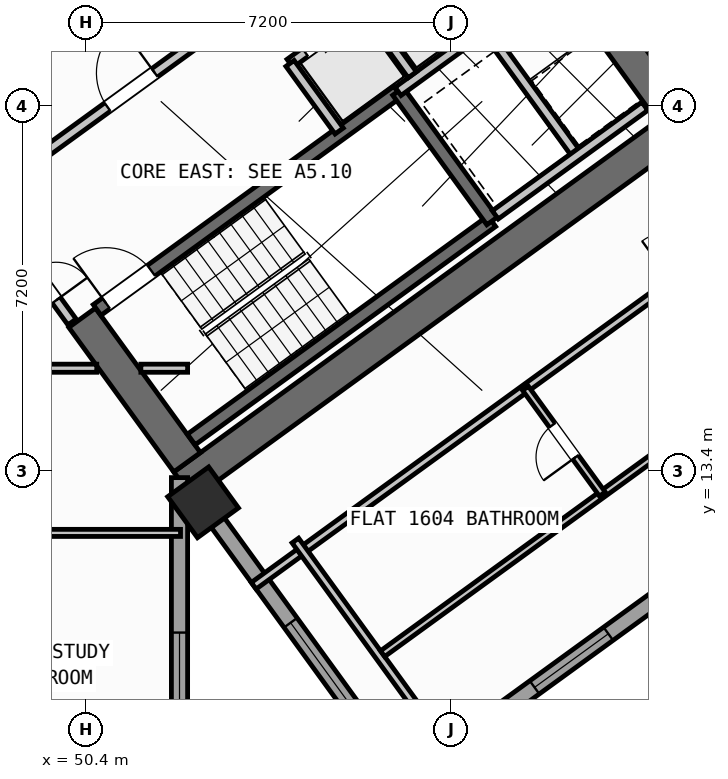
"""IFC4 building model, lengths in metres.
Left out: names, types, materials, properties, quantities, classifications, styles, units other than length and angle.
Written with IfcOpenShell. Run it as: python <this file> out.ifc"""

import sys

from ifc_helpers import new_model, si_unit, direction, frame, frame_2d, origin, origin_2d, place, context, subcontext, project, spatial, rectangle, hollow_rectangle, extrude, source, transform, mapped, element, fill, save


model = new_model("IFC4")
c1 = context("Model", 3, precision=1e-05, world=origin(), true_north=direction((0.0, 1.0)))
c2 = subcontext(c1, "Body", "Model", "MODEL_VIEW")
j1 = project(units=[si_unit("LENGTHUNIT", "METRE"), si_unit("PLANEANGLEUNIT", "RADIAN")], contexts=[c1])
p1 = place(None, origin())
s1 = spatial("IfcSite", under=j1, at=p1, CompositionType="ELEMENT")
p2 = place(p1, origin())
s2 = spatial("IfcBuilding", under=s1, at=p2, CompositionType="ELEMENT")
p3 = place(p2, frame((0.0, 0.0, 63.6)))
s3 = spatial("IfcBuildingStorey", under=s2, at=p3, CompositionType="ELEMENT", Elevation=63.6)
p4 = place(p3, frame((52.318, 13.11, 0.0), z_axis=(0.0, 0.0, 1.0), x_axis=(0.809019445368, 0.587781878776, 0.0)))
e1 = element("IfcWall", 1, at=p4, inside=s3, PredefinedType="SHEAR", context=c2, shape_type="SweptSolid", body=[
    extrude(rectangle(XDim=12.44, YDim=0.65, at=frame_2d((6.22, 0.0))), origin(), (0.0, 0.0, 1.0), 3.35),
])
p5 = place(p3, frame((52.39, 13.564, 0.0), z_axis=(0.0, 0.0, 1.0), x_axis=(-0.58779688989, 0.809008539037, 0.0)))
e2 = element("IfcWall", 2, at=p5, inside=s3, PredefinedType="SHEAR", context=c2, shape_type="SweptSolid", body=[
    extrude(rectangle(XDim=3.525, YDim=0.65, at=frame_2d((1.763, 0.0))), origin(), (0.0, 0.0, 1.0), 3.35),
])
p6 = place(p3, frame((61.929, 20.494, 0.0), z_axis=(0.0, 0.0, 1.0), x_axis=(-0.58782982593, 0.808984607855, 0.0)))
e3 = element("IfcWall", 3, at=p6, inside=s3, PredefinedType="SHEAR", context=c2, shape_type="SweptSolid", body=[
    extrude(rectangle(XDim=3.525, YDim=0.65, at=frame_2d((1.762, 0.0))), origin(), (0.0, 0.0, 1.0), 3.35),
])
m1 = source(origin(), c2, "Body", "SweptSolid", [
    extrude(hollow_rectangle(XDim=1.0, YDim=1.0, WallThickness=0.04, at=origin_2d()), origin(), (0.0, 0.0, 1.0), 3.6),
])
p7 = place(p3, frame((52.705, 12.773, 0.0), z_axis=(0.0, 0.0, 1.0), x_axis=(0.809016994375, 0.587785252292, 0.0)))
e4 = element("IfcColumn", 4, at=p7, inside=s3, PredefinedType="COLUMN", context=c2, shape_type="MappedRepresentation", body=[
    mapped(m1, transform((0.0, 0.0, 0.0), scale=1.0)),
])
p8 = place(p3, frame((58.455, 35.484, 0.0), z_axis=(0.0, 0.0, 1.0), x_axis=(0.587783625747, -0.809018176127, 0.0)))
e5 = element("IfcWall", 5, at=p8, inside=s3, PredefinedType="STANDARD", context=c2, shape_type="SweptSolid", body=[
    extrude(rectangle(XDim=21.587, YDim=0.32, at=frame_2d((10.794, 0.0))), origin(), (0.0, 0.0, 1.0), 2.725),
])
p9 = place(p8, frame((2.994, 0.0, 0.8)))
e6 = element("IfcOpeningElement", 6, at=p9, cuts=e5, PredefinedType="OPENING", context=c2, shape_type="SweptSolid", body=[
    extrude(rectangle(XDim=2.1, YDim=1.55, at=frame_2d((1.05, 0.775))), frame((0.0, 0.17, 0.0), z_axis=(0.0, -1.0, 0.0), x_axis=(1.0, 0.0, 0.0)), (0.0, 0.0, 1.0), 0.34),
])
p10 = place(p8, frame((11.934, 0.0, 0.85)))
e7 = element("IfcOpeningElement", 7, at=p10, cuts=e5, PredefinedType="OPENING", context=c2, shape_type="SweptSolid", body=[
    extrude(rectangle(XDim=1.8, YDim=1.5, at=frame_2d((0.9, 0.75))), frame((0.0, 0.17, 0.0), z_axis=(0.0, -1.0, 0.0), x_axis=(1.0, 0.0, 0.0)), (0.0, 0.0, 1.0), 0.34),
])
p11 = place(p8, frame((18.535, 0.0, 0.85)))
e8 = element("IfcOpeningElement", 8, at=p11, cuts=e5, PredefinedType="OPENING", context=c2, shape_type="SweptSolid", body=[
    extrude(rectangle(XDim=1.5, YDim=1.5, at=frame_2d((0.75, 0.75))), frame((0.0, 0.17, 0.0), z_axis=(0.0, -1.0, 0.0), x_axis=(1.0, 0.0, 0.0)), (0.0, 0.0, 1.0), 0.34),
])
p12 = place(p3, frame((71.098, 17.731, 0.0), z_axis=(0.0, 0.0, 1.0), x_axis=(-0.809021120468, -0.587779573171, 0.0)))
e9 = element("IfcWall", 9, at=p12, inside=s3, PredefinedType="STANDARD", context=c2, shape_type="SweptSolid", body=[
    extrude(rectangle(XDim=17.588, YDim=0.32, at=frame_2d((8.794, 0.0))), origin(), (0.0, 0.0, 1.0), 3.35),
])
p13 = place(p12, frame((1.624, 0.0, 0.0)))
e10 = element("IfcOpeningElement", 10, at=p13, cuts=e9, PredefinedType="OPENING", context=c2, shape_type="SweptSolid", body=[
    extrude(rectangle(XDim=1.05, YDim=2.15, at=frame_2d((0.525, 1.075))), frame((0.0, 0.17, 0.0), z_axis=(0.0, -1.0, 0.0), x_axis=(1.0, 0.0, 0.0)), (0.0, 0.0, 1.0), 0.34),
])
p14 = place(p12, frame((4.104, 0.0, 1.0)))
e11 = element("IfcOpeningElement", 11, at=p14, cuts=e9, PredefinedType="OPENING", context=c2, shape_type="SweptSolid", body=[
    extrude(rectangle(XDim=0.9, YDim=1.25, at=frame_2d((0.45, 0.625))), frame((0.0, 0.17, 0.0), z_axis=(0.0, -1.0, 0.0), x_axis=(1.0, 0.0, 0.0)), (0.0, 0.0, 1.0), 0.34),
])
p15 = place(p12, frame((7.879, 0.0, 0.85)))
e12 = element("IfcOpeningElement", 12, at=p15, cuts=e9, PredefinedType="OPENING", context=c2, shape_type="SweptSolid", body=[
    extrude(rectangle(XDim=1.8, YDim=1.5, at=frame_2d((0.9, 0.75))), frame((0.0, 0.17, 0.0), z_axis=(0.0, -1.0, 0.0), x_axis=(1.0, 0.0, 0.0)), (0.0, 0.0, 1.0), 0.34),
])
p16 = place(p12, frame((12.849, 0.0, 0.85)))
e13 = element("IfcOpeningElement", 13, at=p16, cuts=e9, PredefinedType="OPENING", context=c2, shape_type="SweptSolid", body=[
    extrude(rectangle(XDim=1.8, YDim=1.5, at=frame_2d((0.9, 0.75))), frame((0.0, 0.17, 0.0), z_axis=(0.0, -1.0, 0.0), x_axis=(1.0, 0.0, 0.0)), (0.0, 0.0, 1.0), 0.34),
])
p17 = place(p3, frame((56.581, 7.439, 0.0), z_axis=(0.0, 0.0, 1.0), x_axis=(-0.587785875463, 0.809016541614, 0.0)))
e14 = element("IfcWall", 14, at=p17, inside=s3, PredefinedType="STANDARD", context=c2, shape_type="SweptSolid", body=[
    extrude(rectangle(XDim=6.774, YDim=0.32, at=frame_2d((3.387, 0.0))), origin(), (0.0, 0.0, 1.0), 2.725),
])
p18 = place(p17, frame((1.556, 0.0, 0.8)))
e15 = element("IfcOpeningElement", 15, at=p18, cuts=e14, PredefinedType="OPENING", context=c2, shape_type="SweptSolid", body=[
    extrude(rectangle(XDim=2.1, YDim=1.55, at=frame_2d((1.05, 0.775))), frame((0.0, 0.17, 0.0), z_axis=(0.0, -1.0, 0.0), x_axis=(1.0, 0.0, 0.0)), (0.0, 0.0, 1.0), 0.34),
])
p19 = place(p3, frame((52.24, 13.261, 0.0), z_axis=(0.0, 0.0, 1.0), x_axis=(0.0, -1.0, 0.0)))
e16 = element("IfcWall", 16, at=p19, inside=s3, PredefinedType="STANDARD", context=c2, shape_type="SweptSolid", body=[
    extrude(rectangle(XDim=9.795, YDim=0.32, at=frame_2d((4.897, 0.0))), origin(), (0.0, 0.0, 1.0), 3.35),
])
p20 = place(p19, frame((3.058, 0.0, 0.8)))
e17 = element("IfcOpeningElement", 17, at=p20, cuts=e16, PredefinedType="OPENING", context=c2, shape_type="SweptSolid", body=[
    extrude(rectangle(XDim=2.1, YDim=1.55, at=frame_2d((1.05, 0.775))), frame((0.0, 0.17, 0.0), z_axis=(0.0, -1.0, 0.0), x_axis=(1.0, 0.0, 0.0)), (0.0, 0.0, 1.0), 0.34),
])
p21 = place(p19, frame((7.88, 0.0, 0.95)))
e18 = element("IfcOpeningElement", 18, at=p21, cuts=e16, PredefinedType="OPENING", context=c2, shape_type="SweptSolid", body=[
    extrude(rectangle(XDim=1.2, YDim=1.4, at=frame_2d((0.6, 0.7))), frame((0.0, 0.17, 0.0), z_axis=(0.0, -1.0, 0.0), x_axis=(1.0, 0.0, 0.0)), (0.0, 0.0, 1.0), 0.34),
])
p22 = place(p3, frame((52.472, 14.013, 0.0), z_axis=(0.0, 0.0, 1.0), x_axis=(0.809028366311, 0.587769599847, 0.0)))
e19 = element("IfcWall", 19, at=p22, inside=s3, PredefinedType="SHEAR", context=c2, shape_type="SweptSolid", body=[
    extrude(rectangle(XDim=7.33, YDim=0.26, at=frame_2d((3.665, 0.0))), origin(), (0.0, 0.0, 1.0), 3.35),
])
p23 = place(p3, frame((50.615, 16.57, 0.0), z_axis=(0.0, 0.0, 1.0), x_axis=(0.809028366311, 0.587769599847, 0.0)))
e20 = element("IfcWall", 20, at=p23, inside=s3, PredefinedType="SHEAR", context=c2, shape_type="SweptSolid", body=[
    extrude(rectangle(XDim=7.33, YDim=0.26, at=frame_2d((3.665, 0.0))), origin(), (0.0, 0.0, 1.0), 3.35),
])
p24 = place(p23, frame((0.22, 0.0, 0.0)))
e21 = element("IfcOpeningElement", 21, at=p24, cuts=e20, PredefinedType="OPENING", context=c2, shape_type="SweptSolid", body=[
    extrude(rectangle(XDim=1.1, YDim=2.1, at=frame_2d((0.55, 1.05))), frame((0.0, 0.14, 0.0), z_axis=(0.0, -1.0, 0.0), x_axis=(1.0, 0.0, 0.0)), (0.0, 0.0, 1.0), 0.28),
])
p25 = place(p3, frame((58.41, 18.327, 0.0), z_axis=(0.0, 0.0, 1.0), x_axis=(-0.58776738483, 0.809029975545, 0.0)))
e22 = element("IfcWall", 22, at=p25, inside=s3, PredefinedType="SHEAR", context=c2, shape_type="SweptSolid", body=[
    extrude(rectangle(XDim=3.16, YDim=0.26, at=frame_2d((1.58, 0.0))), origin(), (0.0, 0.0, 1.0), 3.35),
])
p26 = place(p3, frame((47.106, 21.437, 0.0), z_axis=(0.0, 0.0, 1.0), x_axis=(0.809012514015, 0.58779141893, 0.0)))
e23 = element("IfcWall", 23, at=p26, inside=s3, PredefinedType="STANDARD", context=c2, shape_type="SweptSolid", body=[
    extrude(rectangle(XDim=3.398, YDim=0.2, at=frame_2d((1.699, 0.0))), origin(), (0.0, 0.0, 1.0), 3.34),
])
p27 = place(p26, frame((0.408, 0.0, 0.0)))
e24 = element("IfcOpeningElement", 24, at=p27, cuts=e23, PredefinedType="OPENING", context=c2, shape_type="SweptSolid", body=[
    extrude(rectangle(XDim=1.3, YDim=2.2, at=frame_2d((0.65, 1.1))), frame((0.0, 0.11, 0.0), z_axis=(0.0, -1.0, 0.0), x_axis=(1.0, 0.0, 0.0)), (0.0, 0.0, 1.0), 0.22),
])
p28 = place(p3, frame((48.799, 19.107, 0.0), z_axis=(0.0, 0.0, 1.0), x_axis=(0.809012959416, 0.587790805897, 0.0)))
e25 = element("IfcWall", 25, at=p28, inside=s3, PredefinedType="STANDARD", context=c2, shape_type="SweptSolid", body=[
    extrude(rectangle(XDim=5.718, YDim=0.2, at=frame_2d((2.859, 0.0))), origin(), (0.0, 0.0, 1.0), 3.34),
])
p29 = place(p28, frame((2.498, 0.0, 0.0)))
e26 = element("IfcOpeningElement", 26, at=p29, cuts=e25, PredefinedType="OPENING", context=c2, shape_type="SweptSolid", body=[
    extrude(rectangle(XDim=1.15, YDim=2.1, at=frame_2d((0.575, 1.05))), frame((0.0, 0.11, 0.0), z_axis=(0.0, -1.0, 0.0), x_axis=(1.0, 0.0, 0.0)), (0.0, 0.0, 1.0), 0.22),
])
p30 = place(p3, frame((56.553, 20.884, 0.0), z_axis=(0.0, 0.0, 1.0), x_axis=(0.809035789462, 0.587759382205, 0.0)))
e27 = element("IfcWall", 27, at=p30, inside=s3, PredefinedType="STANDARD", context=c2, shape_type="SweptSolid", body=[
    extrude(rectangle(XDim=3.768, YDim=0.2, at=frame_2d((1.884, 0.0))), origin(), (0.0, 0.0, 1.0), 3.34),
])
p31 = place(p30, frame((2.65, 0.0, 0.0)))
e28 = element("IfcOpeningElement", 28, at=p31, cuts=e27, PredefinedType="OPENING", context=c2, shape_type="SweptSolid", body=[
    extrude(rectangle(XDim=0.86, YDim=2.05, at=frame_2d((0.43, 1.025))), frame((0.0, 0.11, 0.0), z_axis=(0.0, -1.0, 0.0), x_axis=(1.0, 0.0, 0.0)), (0.0, 0.0, 1.0), 0.22),
])
p32 = place(p3, frame((54.421, 21.436, 0.0), z_axis=(0.0, 0.0, 1.0), x_axis=(0.809013710463, 0.587789772183, 0.0)))
e29 = element("IfcWall", 29, at=p32, inside=s3, PredefinedType="STANDARD", context=c2, shape_type="SweptSolid", body=[
    extrude(rectangle(XDim=5.36, YDim=0.2, at=frame_2d((2.68, 0.0))), origin(), (0.0, 0.0, 1.0), 3.34),
])
p33 = place(p32, frame((0.37, 0.0, 0.0)))
e30 = element("IfcOpeningElement", 30, at=p33, cuts=e29, PredefinedType="OPENING", context=c2, shape_type="SweptSolid", body=[
    extrude(rectangle(XDim=1.1, YDim=2.15, at=frame_2d((0.55, 1.075))), frame((0.0, 0.11, 0.0), z_axis=(0.0, -1.0, 0.0), x_axis=(1.0, 0.0, 0.0)), (0.0, 0.0, 1.0), 0.22),
])
p34 = place(p32, frame((2.17, 0.0, 0.0)))
e31 = element("IfcOpeningElement", 31, at=p34, cuts=e29, PredefinedType="OPENING", context=c2, shape_type="SweptSolid", body=[
    extrude(rectangle(XDim=1.1, YDim=2.15, at=frame_2d((0.55, 1.075))), frame((0.0, 0.11, 0.0), z_axis=(0.0, -1.0, 0.0), x_axis=(1.0, 0.0, 0.0)), (0.0, 0.0, 1.0), 0.22),
])
p35 = place(p32, frame((3.97, 0.0, 0.0)))
e32 = element("IfcOpeningElement", 32, at=p35, cuts=e29, PredefinedType="OPENING", context=c2, shape_type="SweptSolid", body=[
    extrude(rectangle(XDim=1.1, YDim=2.15, at=frame_2d((0.55, 1.075))), frame((0.0, 0.11, 0.0), z_axis=(0.0, -1.0, 0.0), x_axis=(1.0, 0.0, 0.0)), (0.0, 0.0, 1.0), 0.22),
])
p36 = place(p3, frame((55.391, 20.102, 0.0), z_axis=(0.0, 0.0, 1.0), x_axis=(-0.58778447739, 0.809017557374, 0.0)))
e33 = element("IfcWall", 33, at=p36, inside=s3, PredefinedType="STANDARD", context=c2, shape_type="SweptSolid", body=[
    extrude(rectangle(XDim=1.65, YDim=0.2, at=frame_2d((0.825, 0.0))), origin(), (0.0, 0.0, 1.0), 3.34),
])
p37 = place(p3, frame((56.834, 21.212, 0.0), z_axis=(0.0, 0.0, 1.0), x_axis=(-0.58776738483, 0.809029975545, 0.0)))
e34 = element("IfcWall", 34, at=p37, inside=s3, PredefinedType="STANDARD", context=c2, shape_type="SweptSolid", body=[
    extrude(rectangle(XDim=1.58, YDim=0.2, at=frame_2d((0.79, 0.0))), origin(), (0.0, 0.0, 1.0), 3.34),
])
p38 = place(p3, frame((60.067, 19.655, 0.0), z_axis=(0.0, 0.0, 1.0), x_axis=(-0.587800520745, 0.809005900975, 0.0)))
e35 = element("IfcWall", 35, at=p38, inside=s3, PredefinedType="STANDARD", context=c2, shape_type="SweptSolid", body=[
    extrude(rectangle(XDim=2.66, YDim=0.2, at=frame_2d((1.33, 0.0))), origin(), (0.0, 0.0, 1.0), 3.34),
])
p39 = place(p3, frame((58.472, 18.447, 0.0), z_axis=(0.0, 0.0, 1.0), x_axis=(0.809022487728, 0.587777691266, 0.0)))
e36 = element("IfcWall", 36, at=p39, inside=s3, PredefinedType="STANDARD", context=c2, shape_type="SweptSolid", body=[
    extrude(rectangle(XDim=3.648, YDim=0.2, at=frame_2d((1.824, 0.0))), origin(), (0.0, 0.0, 1.0), 3.34),
])
p40 = place(p3, frame((35.296, 15.42, 0.0), z_axis=(0.0, 0.0, 1.0), x_axis=(1.0, 0.0, 0.0)))
e37 = element("IfcWall", 37, at=p40, inside=s3, PredefinedType="PARTITIONING", context=c2, shape_type="SweptSolid", body=[
    extrude(rectangle(XDim=15.311, YDim=0.16, at=frame_2d((7.655, 0.0))), origin(), (0.0, 0.0, 1.0), 3.34),
])
p41 = place(p40, frame((3.176, 0.0, 0.0)))
e38 = element("IfcOpeningElement", 38, at=p41, cuts=e37, PredefinedType="OPENING", context=c2, shape_type="SweptSolid", body=[
    extrude(rectangle(XDim=1.0, YDim=2.1, at=frame_2d((0.5, 1.05))), frame((0.0, 0.09, 0.0), z_axis=(0.0, -1.0, 0.0), x_axis=(1.0, 0.0, 0.0)), (0.0, 0.0, 1.0), 0.18),
])
p42 = place(p3, frame((51.477, 15.42, 0.0), z_axis=(0.0, 0.0, 1.0), x_axis=(1.0, 0.0, 0.0)))
e39 = element("IfcWall", 39, at=p42, inside=s3, PredefinedType="PARTITIONING", context=c2, shape_type="SweptSolid", body=[
    extrude(rectangle(XDim=0.923, YDim=0.16, at=frame_2d((0.461, 0.0))), origin(), (0.0, 0.0, 1.0), 3.34),
])
p43 = place(p3, frame((50.119, 16.333, 0.0), z_axis=(0.0, 0.0, 1.0), x_axis=(-0.587749856981, 0.809042709391, 0.0)))
e40 = element("IfcWall", 40, at=p43, inside=s3, PredefinedType="STANDARD", context=c2, shape_type="SweptSolid", body=[
    extrude(rectangle(XDim=2.96, YDim=0.2, at=frame_2d((1.48, 0.0))), origin(), (0.0, 0.0, 1.0), 3.34),
])
p44 = place(p43, frame((0.53, 0.0, 0.0)))
e41 = element("IfcOpeningElement", 41, at=p44, cuts=e40, PredefinedType="OPENING", context=c2, shape_type="SweptSolid", body=[
    extrude(rectangle(XDim=1.5, YDim=2.15, at=frame_2d((0.75, 1.075))), frame((0.0, 0.11, 0.0), z_axis=(0.0, -1.0, 0.0), x_axis=(1.0, 0.0, 0.0)), (0.0, 0.0, 1.0), 0.22),
])
p45 = place(p3, frame((42.344, 12.17, 0.0), z_axis=(0.0, 0.0, 1.0), x_axis=(1.0, 0.0, 0.0)))
e42 = element("IfcWall", 42, at=p45, inside=s3, PredefinedType="PLUMBINGWALL", context=c2, shape_type="SweptSolid", body=[
    extrude(rectangle(XDim=9.916, YDim=0.14, at=frame_2d((4.958, 0.0))), origin(), (0.0, 0.0, 1.0), 2.525),
])
p46 = place(p3, frame((53.705, 11.126, 0.0), z_axis=(0.0, 0.0, 1.0), x_axis=(0.809014504436, 0.587788679384, 0.0)))
e43 = element("IfcWall", 43, at=p46, inside=s3, PredefinedType="PARTITIONING", context=c2, shape_type="SweptSolid", body=[
    extrude(rectangle(XDim=14.67, YDim=0.16, at=frame_2d((7.335, 0.0))), origin(), (0.0, 0.0, 1.0), 3.34),
])
p47 = place(p46, frame((10.2, 0.0, 0.0)))
e44 = element("IfcOpeningElement", 44, at=p47, cuts=e43, PredefinedType="OPENING", context=c2, shape_type="SweptSolid", body=[
    extrude(rectangle(XDim=1.0, YDim=2.1, at=frame_2d((0.5, 1.05))), frame((0.0, 0.09, 0.0), z_axis=(0.0, -1.0, 0.0), x_axis=(1.0, 0.0, 0.0)), (0.0, 0.0, 1.0), 0.18),
])
p48 = place(p3, frame((57.747, 7.586, 0.0), z_axis=(0.0, 0.0, 1.0), x_axis=(-0.587784893399, 0.809017255126, 0.0)))
e45 = element("IfcWall", 45, at=p48, inside=s3, PredefinedType="PARTITIONING", context=c2, shape_type="SweptSolid", body=[
    extrude(rectangle(XDim=5.48, YDim=0.16, at=frame_2d((2.74, 0.0))), origin(), (0.0, 0.0, 1.0), 3.34),
])
p49 = place(p3, frame((56.249, 9.785, 0.0), z_axis=(0.0, 0.0, 1.0), x_axis=(0.809011747655, 0.587792473715, 0.0)))
e46 = element("IfcWall", 46, at=p49, inside=s3, PredefinedType="PLUMBINGWALL", context=c2, shape_type="SweptSolid", body=[
    extrude(rectangle(XDim=13.4, YDim=0.14, at=frame_2d((6.7, 0.0))), origin(), (0.0, 0.0, 1.0), 3.34),
])
p50 = place(p49, frame((8.94, 0.0, 0.0)))
e47 = element("IfcOpeningElement", 47, at=p50, cuts=e46, PredefinedType="OPENING", context=c2, shape_type="SweptSolid", body=[
    extrude(rectangle(XDim=0.92, YDim=2.08, at=frame_2d((0.46, 1.04))), frame((0.0, 0.08, 0.0), z_axis=(0.0, -1.0, 0.0), x_axis=(1.0, 0.0, 0.0)), (0.0, 0.0, 1.0), 0.16),
])
p51 = place(p3, frame((60.585, 12.936, 0.0), z_axis=(0.0, 0.0, 1.0), x_axis=(-0.587772116736, 0.809026537752, 0.0)))
e48 = element("IfcWall", 48, at=p51, inside=s3, PredefinedType="PLUMBINGWALL", context=c2, shape_type="SweptSolid", body=[
    extrude(rectangle(XDim=2.58, YDim=0.14, at=frame_2d((1.29, 0.0))), origin(), (0.0, 0.0, 1.0), 3.34),
])
p52 = place(p51, frame((0.9, 0.0, 0.0)))
e49 = element("IfcOpeningElement", 49, at=p52, cuts=e48, PredefinedType="OPENING", context=c2, shape_type="SweptSolid", body=[
    extrude(rectangle(XDim=0.78, YDim=2.05, at=frame_2d((0.39, 1.025))), frame((0.0, 0.08, 0.0), z_axis=(0.0, -1.0, 0.0), x_axis=(1.0, 0.0, 0.0)), (0.0, 0.0, 1.0), 0.16),
])
m2 = source(origin(), c2, "Body", "SweptSolid", [
    extrude(rectangle(XDim=1.8, YDim=1.5, at=frame_2d((0.9, 0.75))), frame((0.0, 0.03, 0.0), z_axis=(0.0, -1.0, 0.0), x_axis=(1.0, 0.0, 0.0)), (0.0, 0.0, 1.0), 0.06),
])
p53 = place(p16, origin())
e50 = element("IfcWindow", 50, at=p53, inside=s3, PartitioningType="SINGLE_PANEL", PredefinedType="WINDOW", context=c2, shape_type="MappedRepresentation", body=[
    mapped(m2, transform((0.0, 0.0, 0.0), scale=1.0)),
])
fill(e13, e50)
m3 = source(origin(), c2, "Body", "SweptSolid", [
    extrude(rectangle(XDim=2.1, YDim=1.55, at=frame_2d((1.05, 0.775))), frame((0.0, 0.03, 0.0), z_axis=(0.0, -1.0, 0.0), x_axis=(1.0, 0.0, 0.0)), (0.0, 0.0, 1.0), 0.06),
])
p54 = place(p18, origin())
e51 = element("IfcWindow", 51, at=p54, inside=s3, PartitioningType="SINGLE_PANEL", PredefinedType="WINDOW", context=c2, shape_type="MappedRepresentation", body=[
    mapped(m3, transform((0.0, 0.0, 0.0), scale=1.0)),
])
fill(e15, e51)
p55 = place(p20, origin())
e52 = element("IfcWindow", 52, at=p55, inside=s3, PartitioningType="SINGLE_PANEL", PredefinedType="WINDOW", context=c2, shape_type="MappedRepresentation", body=[
    mapped(m3, transform((0.0, 0.0, 0.0), scale=1.0)),
])
fill(e17, e52)
m4 = source(origin(), c2, "Body", "SweptSolid", [
    extrude(rectangle(XDim=1.1, YDim=2.1, at=frame_2d((0.55, 1.05))), frame((0.0, 0.025, 0.0), z_axis=(0.0, -1.0, 0.0), x_axis=(1.0, 0.0, 0.0)), (0.0, 0.0, 1.0), 0.05),
])
p56 = place(p24, origin())
e53 = element("IfcDoor", 53, at=p56, inside=s3, OperationType="SINGLE_SWING_LEFT", PredefinedType="DOOR", context=c2, shape_type="MappedRepresentation", body=[
    mapped(m4, transform((0.0, 0.0, 0.0), scale=1.0)),
])
fill(e21, e53)
m5 = source(origin(), c2, "Body", "SweptSolid", [
    extrude(rectangle(XDim=1.15, YDim=2.1, at=frame_2d((0.575, 1.05))), frame((0.0, 0.025, 0.0), z_axis=(0.0, -1.0, 0.0), x_axis=(1.0, 0.0, 0.0)), (0.0, 0.0, 1.0), 0.05),
])
p57 = place(p29, origin())
e54 = element("IfcDoor", 54, at=p57, inside=s3, OperationType="SINGLE_SWING_RIGHT", PredefinedType="DOOR", context=c2, shape_type="MappedRepresentation", body=[
    mapped(m5, transform((0.0, 0.0, 0.0), scale=1.0)),
])
fill(e26, e54)
m6 = source(origin(), c2, "Body", "SweptSolid", [
    extrude(rectangle(XDim=1.1, YDim=2.15, at=frame_2d((0.55, 1.075))), frame((0.0, 0.025, 0.0), z_axis=(0.0, -1.0, 0.0), x_axis=(1.0, 0.0, 0.0)), (0.0, 0.0, 1.0), 0.05),
])
p58 = place(p33, origin())
e55 = element("IfcDoor", 55, at=p58, inside=s3, OperationType="DOUBLE_DOOR_SLIDING", PredefinedType="DOOR", context=c2, shape_type="MappedRepresentation", body=[
    mapped(m6, transform((0.0, 0.0, 0.0), scale=1.0)),
])
fill(e30, e55)
m7 = source(origin(), c2, "Body", "SweptSolid", [
    extrude(rectangle(XDim=1.5, YDim=2.15, at=frame_2d((0.75, 1.075))), frame((0.0, 0.025, 0.0), z_axis=(0.0, -1.0, 0.0), x_axis=(1.0, 0.0, 0.0)), (0.0, 0.0, 1.0), 0.05),
])
p59 = place(p44, frame((1.5, 0.0, 0.0), z_axis=(0.0, 0.0, 1.0), x_axis=(-1.0, 0.0, 0.0)))
e56 = element("IfcDoor", 56, at=p59, inside=s3, OperationType="DOUBLE_DOOR_SINGLE_SWING", PredefinedType="DOOR", context=c2, shape_type="MappedRepresentation", body=[
    mapped(m7, transform((0.0, 0.0, 0.0), scale=1.0)),
])
fill(e41, e56)
m8 = source(origin(), c2, "Body", "SweptSolid", [
    extrude(rectangle(XDim=0.78, YDim=2.05, at=frame_2d((0.39, 1.025))), frame((0.0, 0.025, 0.0), z_axis=(0.0, -1.0, 0.0), x_axis=(1.0, 0.0, 0.0)), (0.0, 0.0, 1.0), 0.05),
])
p60 = place(p52, origin())
e57 = element("IfcDoor", 57, at=p60, inside=s3, OperationType="SINGLE_SWING_LEFT", PredefinedType="DOOR", context=c2, shape_type="MappedRepresentation", body=[
    mapped(m8, transform((0.0, 0.0, 0.0), scale=1.0)),
])
fill(e49, e57)
save(model, sys.argv[1])
